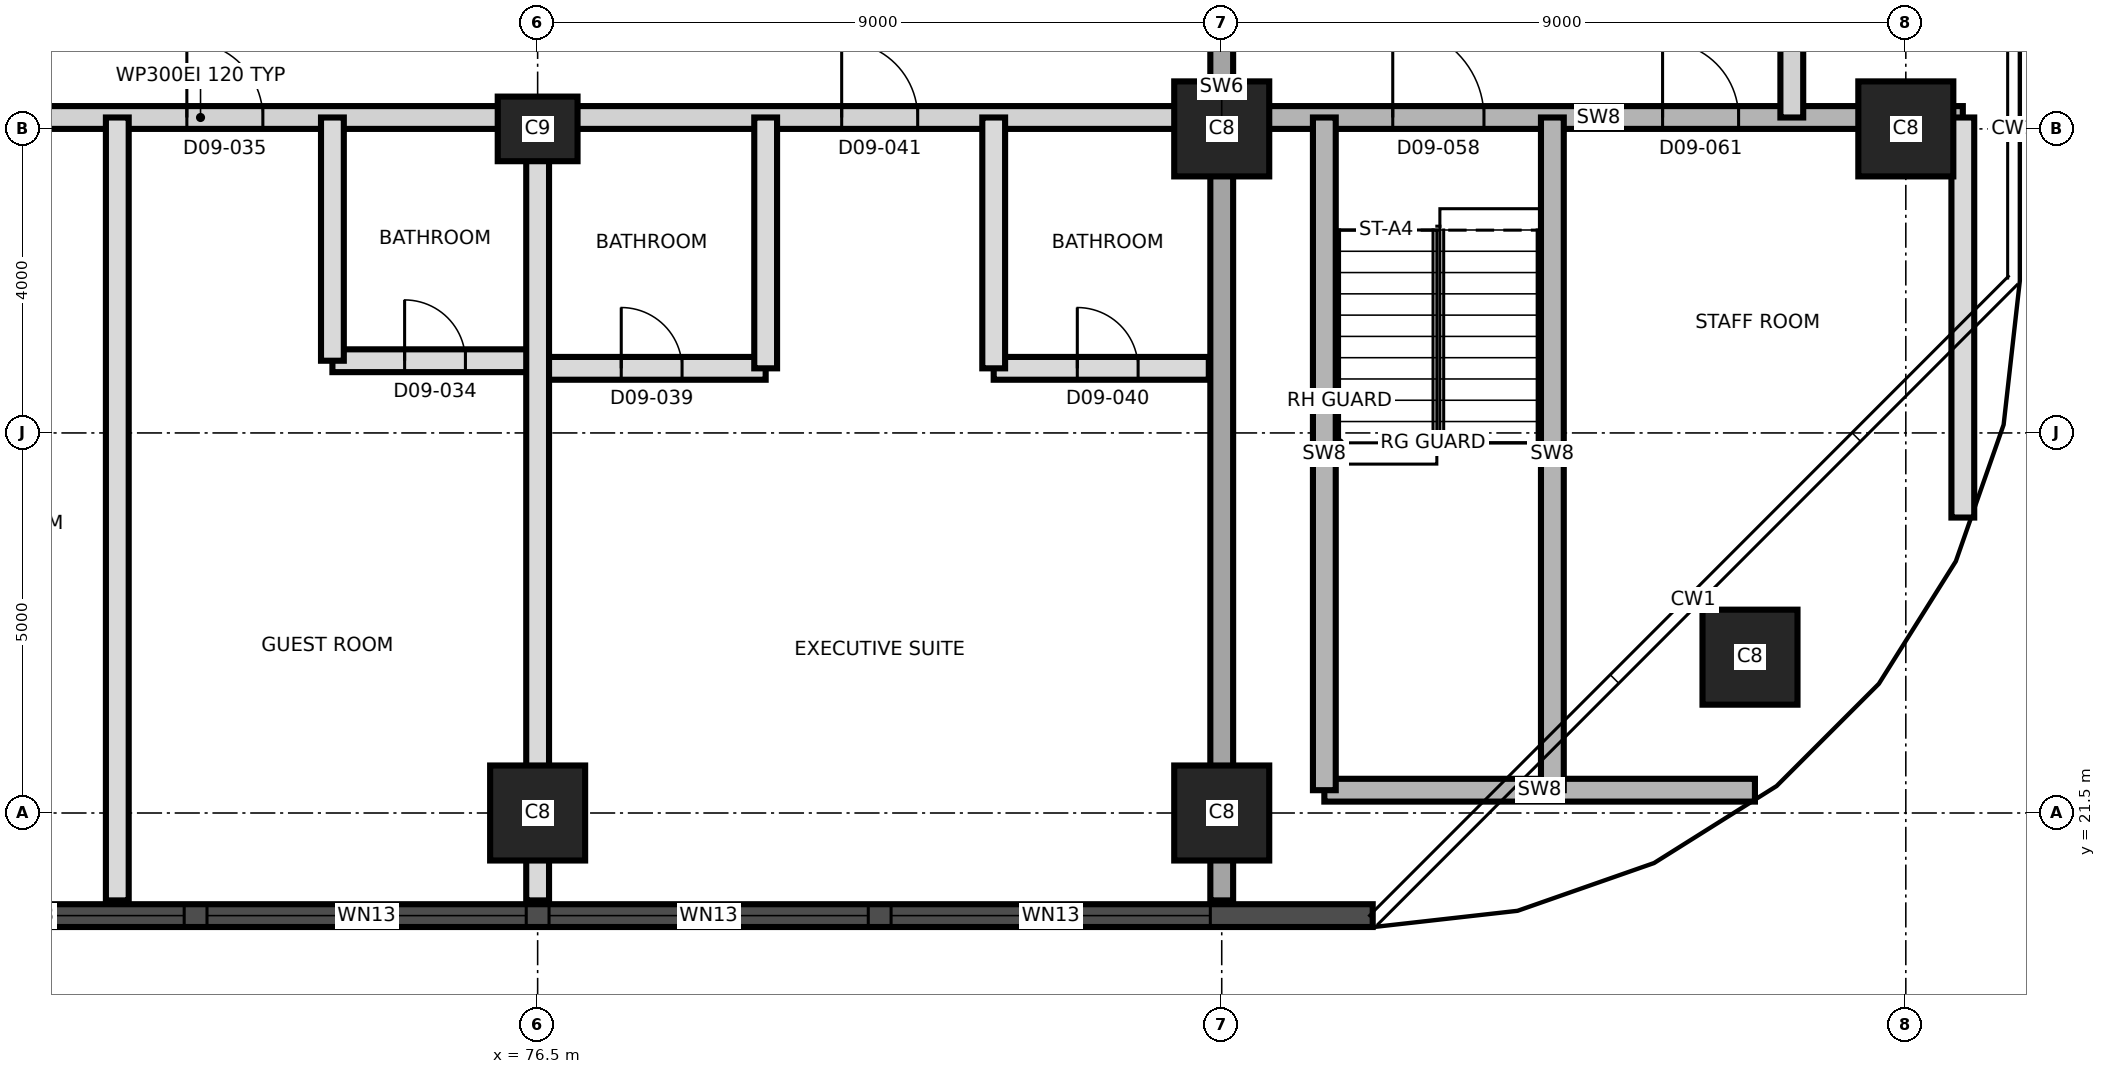
"""IFC4 building model, lengths in metres.
Left out: names, types, materials, properties, quantities, classifications, styles, units other than length and angle.
Written with IfcOpenShell. Run it as: python <this file> out.ifc"""

import sys

from ifc_helpers import new_model, si_unit, direction, frame, frame_2d, origin, origin_2d, place, context, subcontext, project, spatial, rectangle, extrude, element, fill, save


model = new_model("IFC4")
c1 = context("Model", 3, precision=1e-05, world=origin(), true_north=direction((0.0, 1.0)))
c2 = subcontext(c1, "Body", "Model", "MODEL_VIEW")
j1 = project(units=[si_unit("LENGTHUNIT", "METRE"), si_unit("PLANEANGLEUNIT", "RADIAN")], contexts=[c1])
p1 = place(None, origin())
s1 = spatial("IfcSite", under=j1, at=p1, CompositionType="ELEMENT")
p2 = place(p1, origin())
s2 = spatial("IfcBuilding", under=s1, at=p2, CompositionType="ELEMENT")
p3 = place(p2, frame((0.0, 0.0, 105.6)))
s3 = spatial("IfcBuildingStorey", under=s2, at=p3, CompositionType="ELEMENT", Elevation=105.6)
for number, where, z_axis, x_axis in (
    (1, (76.5, 21.5, 0.0), (0.0, 0.0, 1.0), (1.0, 0.0, 0.0)),
    (2, (85.5, 21.5, 0.0), (0.0, 0.0, 1.0), (1.0, 0.0, 0.0)),
    (3, (92.45, 23.55, 0.0), (0.0, 0.0, 1.0), (1.0, 0.0, 0.0)),
):
    element("IfcColumn", number, at=place(p3, frame(where, z_axis=z_axis, x_axis=x_axis)), inside=s3, PredefinedType="COLUMN", context=c2, shape_type="SweptSolid", body=[
        extrude(rectangle(XDim=1.25, YDim=1.25, at=origin_2d()), origin(), (0.0, 0.0, 1.0), 3.7),
    ])
p4 = place(p3, frame((76.5, 30.5, 0.0), z_axis=(0.0, 0.0, 1.0), x_axis=(1.0, 0.0, 0.0)))
e4 = element("IfcColumn", 4, at=p4, inside=s3, PredefinedType="COLUMN", context=c2, shape_type="SweptSolid", body=[
    extrude(rectangle(XDim=1.05, YDim=0.85, at=origin_2d()), origin(), (0.0, 0.0, 1.0), 3.7),
])
for number, where, z_axis, x_axis in (
    (5, (85.5, 30.5, 0.0), (0.0, 0.0, 1.0), (1.0, 0.0, 0.0)),
    (6, (94.5, 30.5, 0.0), (0.0, 0.0, 1.0), (1.0, 0.0, 0.0)),
):
    element("IfcColumn", number, at=place(p3, frame(where, z_axis=z_axis, x_axis=x_axis)), inside=s3, PredefinedType="COLUMN", context=c2, shape_type="SweptSolid", body=[
        extrude(rectangle(XDim=1.25, YDim=1.25, at=origin_2d()), origin(), (0.0, 0.0, 1.0), 3.7),
    ])
p5 = place(p3, frame((85.5, 20.35, 0.0), z_axis=(0.0, 0.0, 1.0), x_axis=(0.0, 1.0, 0.0)))
e7 = element("IfcWall", 7, at=p5, inside=s3, PredefinedType="SHEAR", context=c2, shape_type="SweptSolid", body=[
    extrude(rectangle(XDim=20.3, YDim=0.3, at=frame_2d((10.15, 0.0))), origin(), (0.0, 0.0, 1.0), 3.7),
])
p6 = place(p5, frame((11.35, 0.0, 0.0)))
e8 = element("IfcOpeningElement", 8, at=p6, cuts=e7, PredefinedType="OPENING", context=c2, shape_type="SweptSolid", body=[
    extrude(rectangle(XDim=1.4, YDim=2.1, at=frame_2d((0.7, 1.05))), frame((0.0, 0.16, 0.0), z_axis=(0.0, -1.0, 0.0), x_axis=(1.0, 0.0, 0.0)), (0.0, 0.0, 1.0), 0.32),
])
p7 = place(p3, frame((44.011, 20.15, 0.0), z_axis=(0.0, 0.0, 1.0), x_axis=(1.0, 0.0, 0.0)))
e9 = element("IfcWall", 9, at=p7, inside=s3, PredefinedType="SOLIDWALL", context=c2, shape_type="SweptSolid", body=[
    extrude(rectangle(XDim=43.476, YDim=0.3, at=frame_2d((21.738, 0.0))), origin(), (0.0, 0.0, 1.0), 3.4),
])
p8 = place(p7, frame((1.845, 0.0, 0.3)))
e10 = element("IfcOpeningElement", 10, at=p8, cuts=e9, PredefinedType="OPENING", context=c2, shape_type="SweptSolid", body=[
    extrude(rectangle(XDim=1.8, YDim=2.4, at=frame_2d((0.9, 1.2))), frame((0.0, 0.16, 0.0), z_axis=(0.0, -1.0, 0.0), x_axis=(1.0, 0.0, 0.0)), (0.0, 0.0, 1.0), 0.32),
])
p9 = place(p7, frame((5.639, 0.0, 0.9)))
e11 = element("IfcOpeningElement", 11, at=p9, cuts=e9, PredefinedType="OPENING", context=c2, shape_type="SweptSolid", body=[
    extrude(rectangle(XDim=4.2, YDim=1.7, at=frame_2d((2.1, 0.85))), frame((0.0, 0.16, 0.0), z_axis=(0.0, -1.0, 0.0), x_axis=(1.0, 0.0, 0.0)), (0.0, 0.0, 1.0), 0.32),
])
p10 = place(p7, frame((10.139, 0.0, 0.9)))
e12 = element("IfcOpeningElement", 12, at=p10, cuts=e9, PredefinedType="OPENING", context=c2, shape_type="SweptSolid", body=[
    extrude(rectangle(XDim=4.2, YDim=1.7, at=frame_2d((2.1, 0.85))), frame((0.0, 0.16, 0.0), z_axis=(0.0, -1.0, 0.0), x_axis=(1.0, 0.0, 0.0)), (0.0, 0.0, 1.0), 0.32),
])
p11 = place(p7, frame((14.639, 0.0, 0.9)))
e13 = element("IfcOpeningElement", 13, at=p11, cuts=e9, PredefinedType="OPENING", context=c2, shape_type="SweptSolid", body=[
    extrude(rectangle(XDim=4.2, YDim=1.7, at=frame_2d((2.1, 0.85))), frame((0.0, 0.16, 0.0), z_axis=(0.0, -1.0, 0.0), x_axis=(1.0, 0.0, 0.0)), (0.0, 0.0, 1.0), 0.32),
])
p12 = place(p7, frame((19.139, 0.0, 0.9)))
e14 = element("IfcOpeningElement", 14, at=p12, cuts=e9, PredefinedType="OPENING", context=c2, shape_type="SweptSolid", body=[
    extrude(rectangle(XDim=4.2, YDim=1.7, at=frame_2d((2.1, 0.85))), frame((0.0, 0.16, 0.0), z_axis=(0.0, -1.0, 0.0), x_axis=(1.0, 0.0, 0.0)), (0.0, 0.0, 1.0), 0.32),
])
p13 = place(p7, frame((23.639, 0.0, 0.9)))
e15 = element("IfcOpeningElement", 15, at=p13, cuts=e9, PredefinedType="OPENING", context=c2, shape_type="SweptSolid", body=[
    extrude(rectangle(XDim=4.2, YDim=1.7, at=frame_2d((2.1, 0.85))), frame((0.0, 0.16, 0.0), z_axis=(0.0, -1.0, 0.0), x_axis=(1.0, 0.0, 0.0)), (0.0, 0.0, 1.0), 0.32),
])
p14 = place(p7, frame((28.139, 0.0, 0.9)))
e16 = element("IfcOpeningElement", 16, at=p14, cuts=e9, PredefinedType="OPENING", context=c2, shape_type="SweptSolid", body=[
    extrude(rectangle(XDim=4.2, YDim=1.7, at=frame_2d((2.1, 0.85))), frame((0.0, 0.16, 0.0), z_axis=(0.0, -1.0, 0.0), x_axis=(1.0, 0.0, 0.0)), (0.0, 0.0, 1.0), 0.32),
])
p15 = place(p7, frame((32.639, 0.0, 0.9)))
e17 = element("IfcOpeningElement", 17, at=p15, cuts=e9, PredefinedType="OPENING", context=c2, shape_type="SweptSolid", body=[
    extrude(rectangle(XDim=4.2, YDim=1.7, at=frame_2d((2.1, 0.85))), frame((0.0, 0.16, 0.0), z_axis=(0.0, -1.0, 0.0), x_axis=(1.0, 0.0, 0.0)), (0.0, 0.0, 1.0), 0.32),
])
p16 = place(p7, frame((37.139, 0.0, 0.9)))
e18 = element("IfcOpeningElement", 18, at=p16, cuts=e9, PredefinedType="OPENING", context=c2, shape_type="SweptSolid", body=[
    extrude(rectangle(XDim=4.2, YDim=1.7, at=frame_2d((2.1, 0.85))), frame((0.0, 0.16, 0.0), z_axis=(0.0, -1.0, 0.0), x_axis=(1.0, 0.0, 0.0)), (0.0, 0.0, 1.0), 0.32),
])
p17 = place(p3, frame((86.85, 21.8, 0.0), z_axis=(0.0, 0.0, 1.0), x_axis=(1.0, 0.0, 0.0)))
e19 = element("IfcWall", 19, at=p17, inside=s3, PredefinedType="SHEAR", context=c2, shape_type="SweptSolid", body=[
    extrude(rectangle(XDim=5.665, YDim=0.3, at=frame_2d((2.833, 0.0))), origin(), (0.0, 0.0, 1.0), 3.4),
])
p18 = place(p3, frame((76.5, 27.35, 0.0), z_axis=(0.0, 0.0, 1.0), x_axis=(1.0, 0.0, 0.0)))
e20 = element("IfcWall", 20, at=p18, inside=s3, PredefinedType="PARTITIONING", context=c2, shape_type="SweptSolid", body=[
    extrude(rectangle(XDim=3.0, YDim=0.3, at=frame_2d((1.5, 0.0))), origin(), (0.0, 0.0, 1.0), 3.4),
])
p19 = place(p18, frame((1.1, 0.0, 0.0)))
e21 = element("IfcOpeningElement", 21, at=p19, cuts=e20, PredefinedType="OPENING", context=c2, shape_type="SweptSolid", body=[
    extrude(rectangle(XDim=0.8, YDim=2.1, at=frame_2d((0.4, 1.05))), frame((0.0, 0.16, 0.0), z_axis=(0.0, -1.0, 0.0), x_axis=(1.0, 0.0, 0.0)), (0.0, 0.0, 1.0), 0.32),
])
p20 = place(p3, frame((82.5, 27.35, 0.0), z_axis=(0.0, 0.0, 1.0), x_axis=(1.0, 0.0, 0.0)))
e22 = element("IfcWall", 22, at=p20, inside=s3, PredefinedType="PARTITIONING", context=c2, shape_type="SweptSolid", body=[
    extrude(rectangle(XDim=2.83, YDim=0.3, at=frame_2d((1.415, 0.0))), origin(), (0.0, 0.0, 1.0), 3.4),
])
p21 = place(p20, frame((1.1, 0.0, 0.0)))
e23 = element("IfcOpeningElement", 23, at=p21, cuts=e22, PredefinedType="OPENING", context=c2, shape_type="SweptSolid", body=[
    extrude(rectangle(XDim=0.8, YDim=2.1, at=frame_2d((0.4, 1.05))), frame((0.0, 0.16, 0.0), z_axis=(0.0, -1.0, 0.0), x_axis=(1.0, 0.0, 0.0)), (0.0, 0.0, 1.0), 0.32),
])
p22 = place(p3, frame((73.8, 27.45, 0.0), z_axis=(0.0, 0.0, 1.0), x_axis=(1.0, 0.0, 0.0)))
e24 = element("IfcWall", 24, at=p22, inside=s3, PredefinedType="PARTITIONING", context=c2, shape_type="SweptSolid", body=[
    extrude(rectangle(XDim=2.7, YDim=0.3, at=frame_2d((1.35, 0.0))), origin(), (0.0, 0.0, 1.0), 3.4),
])
p23 = place(p22, frame((0.95, 0.0, 0.0)))
e25 = element("IfcOpeningElement", 25, at=p23, cuts=e24, PredefinedType="OPENING", context=c2, shape_type="SweptSolid", body=[
    extrude(rectangle(XDim=0.8, YDim=2.1, at=frame_2d((0.4, 1.05))), frame((0.0, 0.16, 0.0), z_axis=(0.0, -1.0, 0.0), x_axis=(1.0, 0.0, 0.0)), (0.0, 0.0, 1.0), 0.32),
])
p24 = place(p3, frame((58.8, 30.65, 0.0), z_axis=(0.0, 0.0, 1.0), x_axis=(1.0, 0.0, 0.0)))
e26 = element("IfcWall", 26, at=p24, inside=s3, PredefinedType="PARTITIONING", context=c2, shape_type="SweptSolid", body=[
    extrude(rectangle(XDim=26.53, YDim=0.3, at=frame_2d((13.265, 0.0))), origin(), (0.0, 0.0, 1.0), 3.4),
])
p25 = place(p24, frame((3.115, 0.0, 0.0)))
e27 = element("IfcOpeningElement", 27, at=p25, cuts=e26, PredefinedType="OPENING", context=c2, shape_type="SweptSolid", body=[
    extrude(rectangle(XDim=1.0, YDim=2.1, at=frame_2d((0.5, 1.05))), frame((0.0, 0.16, 0.0), z_axis=(0.0, -1.0, 0.0), x_axis=(1.0, 0.0, 0.0)), (0.0, 0.0, 1.0), 0.32),
])
p26 = place(p24, frame((6.065, 0.0, 0.0)))
e28 = element("IfcOpeningElement", 28, at=p26, cuts=e26, PredefinedType="OPENING", context=c2, shape_type="SweptSolid", body=[
    extrude(rectangle(XDim=1.4, YDim=2.1, at=frame_2d((0.7, 1.05))), frame((0.0, 0.16, 0.0), z_axis=(0.0, -1.0, 0.0), x_axis=(1.0, 0.0, 0.0)), (0.0, 0.0, 1.0), 0.32),
])
p27 = place(p24, frame((9.835, 0.0, 0.0)))
e29 = element("IfcOpeningElement", 29, at=p27, cuts=e26, PredefinedType="OPENING", context=c2, shape_type="SweptSolid", body=[
    extrude(rectangle(XDim=1.2, YDim=2.1, at=frame_2d((0.6, 1.05))), frame((0.0, 0.16, 0.0), z_axis=(0.0, -1.0, 0.0), x_axis=(1.0, 0.0, 0.0)), (0.0, 0.0, 1.0), 0.32),
])
p28 = place(p24, frame((13.085, 0.0, 0.0)))
e30 = element("IfcOpeningElement", 30, at=p28, cuts=e26, PredefinedType="OPENING", context=c2, shape_type="SweptSolid", body=[
    extrude(rectangle(XDim=1.0, YDim=2.1, at=frame_2d((0.5, 1.05))), frame((0.0, 0.16, 0.0), z_axis=(0.0, -1.0, 0.0), x_axis=(1.0, 0.0, 0.0)), (0.0, 0.0, 1.0), 0.32),
])
p29 = place(p24, frame((21.7, 0.0, 0.0)))
e31 = element("IfcOpeningElement", 31, at=p29, cuts=e26, PredefinedType="OPENING", context=c2, shape_type="SweptSolid", body=[
    extrude(rectangle(XDim=1.0, YDim=2.4, at=frame_2d((0.5, 1.2))), frame((0.0, 0.16, 0.0), z_axis=(0.0, -1.0, 0.0), x_axis=(1.0, 0.0, 0.0)), (0.0, 0.0, 1.0), 0.32),
])
p30 = place(p3, frame((85.67, 30.65, 0.0), z_axis=(0.0, 0.0, 1.0), x_axis=(1.0, 0.0, 0.0)))
e32 = element("IfcWall", 32, at=p30, inside=s3, PredefinedType="SHEAR", context=c2, shape_type="SweptSolid", body=[
    extrude(rectangle(XDim=9.58, YDim=0.3, at=frame_2d((4.79, 0.0))), origin(), (0.0, 0.0, 1.0), 3.4),
])
p31 = place(p30, frame((2.08, 0.0, 0.0)))
e33 = element("IfcOpeningElement", 33, at=p31, cuts=e32, PredefinedType="OPENING", context=c2, shape_type="SweptSolid", body=[
    extrude(rectangle(XDim=1.2, YDim=2.1, at=frame_2d((0.6, 1.05))), frame((0.0, 0.16, 0.0), z_axis=(0.0, -1.0, 0.0), x_axis=(1.0, 0.0, 0.0)), (0.0, 0.0, 1.0), 0.32),
])
p32 = place(p30, frame((5.63, 0.0, 0.0)))
e34 = element("IfcOpeningElement", 34, at=p32, cuts=e32, PredefinedType="OPENING", context=c2, shape_type="SweptSolid", body=[
    extrude(rectangle(XDim=1.0, YDim=2.1, at=frame_2d((0.5, 1.05))), frame((0.0, 0.16, 0.0), z_axis=(0.0, -1.0, 0.0), x_axis=(1.0, 0.0, 0.0)), (0.0, 0.0, 1.0), 0.32),
])
p33 = place(p3, frame((70.97, 20.35, 0.0), z_axis=(0.0, 0.0, 1.0), x_axis=(0.0, 1.0, 0.0)))
e35 = element("IfcWall", 35, at=p33, inside=s3, PredefinedType="PARTITIONING", context=c2, shape_type="SweptSolid", body=[
    extrude(rectangle(XDim=10.3, YDim=0.3, at=frame_2d((5.15, 0.0))), origin(), (0.0, 0.0, 1.0), 3.4),
])
p34 = place(p3, frame((73.8, 27.45, 0.0), z_axis=(0.0, 0.0, 1.0), x_axis=(0.0, 1.0, 0.0)))
e36 = element("IfcWall", 36, at=p34, inside=s3, PredefinedType="PARTITIONING", context=c2, shape_type="SweptSolid", body=[
    extrude(rectangle(XDim=3.2, YDim=0.3, at=frame_2d((1.6, 0.0))), origin(), (0.0, 0.0, 1.0), 3.4),
])
p35 = place(p3, frame((76.5, 20.35, 0.0), z_axis=(0.0, 0.0, 1.0), x_axis=(0.0, 1.0, 0.0)))
e37 = element("IfcWall", 37, at=p35, inside=s3, PredefinedType="PARTITIONING", context=c2, shape_type="SweptSolid", body=[
    extrude(rectangle(XDim=10.3, YDim=0.3, at=frame_2d((5.15, 0.0))), origin(), (0.0, 0.0, 1.0), 3.4),
])
for number, where, z_axis, x_axis in (
    (38, (79.5, 27.35, 0.0), (0.0, 0.0, 1.0), (0.0, 1.0, 0.0)),
    (39, (82.5, 27.35, 0.0), (0.0, 0.0, 1.0), (0.0, 1.0, 0.0)),
):
    element("IfcWall", number, at=place(p3, frame(where, z_axis=z_axis, x_axis=x_axis)), inside=s3, PredefinedType="PARTITIONING", context=c2, shape_type="SweptSolid", body=[
        extrude(rectangle(XDim=3.3, YDim=0.3, at=frame_2d((1.65, 0.0))), origin(), (0.0, 0.0, 1.0), 3.4),
    ])
for number, where, z_axis, x_axis in (
    (40, (86.85, 21.8, 0.0), (0.0, 0.0, 1.0), (0.0, 1.0, 0.0)),
    (41, (89.85, 21.8, 0.0), (0.0, 0.0, 1.0), (0.0, 1.0, 0.0)),
):
    element("IfcWall", number, at=place(p3, frame(where, z_axis=z_axis, x_axis=x_axis)), inside=s3, PredefinedType="SHEAR", context=c2, shape_type="SweptSolid", body=[
        extrude(rectangle(XDim=8.85, YDim=0.3, at=frame_2d((4.425, 0.0))), origin(), (0.0, 0.0, 1.0), 3.4),
    ])
p36 = place(p3, frame((93.0, 30.65, 0.0), z_axis=(0.0, 0.0, 1.0), x_axis=(0.0, 1.0, 0.0)))
e42 = element("IfcWall", 42, at=p36, inside=s3, PredefinedType="PARTITIONING", context=c2, shape_type="SweptSolid", body=[
    extrude(rectangle(XDim=2.7, YDim=0.3, at=frame_2d((1.35, 0.0))), origin(), (0.0, 0.0, 1.0), 3.4),
])
p37 = place(p3, frame((95.25, 25.387, 0.0), z_axis=(0.0, 0.0, 1.0), x_axis=(0.0, 1.0, 0.0)))
e43 = element("IfcWall", 43, at=p37, inside=s3, PredefinedType="PARTITIONING", context=c2, shape_type="SweptSolid", body=[
    extrude(rectangle(XDim=5.263, YDim=0.3, at=frame_2d((2.631, 0.0))), origin(), (0.0, 0.0, 1.0), 3.4),
])
p38 = place(p13, origin())
e44 = element("IfcWindow", 44, at=p38, inside=s3, PartitioningType="SINGLE_PANEL", PredefinedType="WINDOW", context=c2, shape_type="SweptSolid", body=[
    extrude(rectangle(XDim=4.2, YDim=1.7, at=frame_2d((2.1, 0.85))), frame((0.0, 0.03, 0.0), z_axis=(0.0, -1.0, 0.0), x_axis=(1.0, 0.0, 0.0)), (0.0, 0.0, 1.0), 0.06),
])
fill(e15, e44)
p39 = place(p14, origin())
e45 = element("IfcWindow", 45, at=p39, inside=s3, PartitioningType="SINGLE_PANEL", PredefinedType="WINDOW", context=c2, shape_type="SweptSolid", body=[
    extrude(rectangle(XDim=4.2, YDim=1.7, at=frame_2d((2.1, 0.85))), frame((0.0, 0.03, 0.0), z_axis=(0.0, -1.0, 0.0), x_axis=(1.0, 0.0, 0.0)), (0.0, 0.0, 1.0), 0.06),
])
fill(e16, e45)
p40 = place(p15, origin())
e46 = element("IfcWindow", 46, at=p40, inside=s3, PartitioningType="SINGLE_PANEL", PredefinedType="WINDOW", context=c2, shape_type="SweptSolid", body=[
    extrude(rectangle(XDim=4.2, YDim=1.7, at=frame_2d((2.1, 0.85))), frame((0.0, 0.03, 0.0), z_axis=(0.0, -1.0, 0.0), x_axis=(1.0, 0.0, 0.0)), (0.0, 0.0, 1.0), 0.06),
])
fill(e17, e46)
p41 = place(p16, origin())
e47 = element("IfcWindow", 47, at=p41, inside=s3, PartitioningType="SINGLE_PANEL", PredefinedType="WINDOW", context=c2, shape_type="SweptSolid", body=[
    extrude(rectangle(XDim=4.2, YDim=1.7, at=frame_2d((2.1, 0.85))), frame((0.0, 0.03, 0.0), z_axis=(0.0, -1.0, 0.0), x_axis=(1.0, 0.0, 0.0)), (0.0, 0.0, 1.0), 0.06),
])
fill(e18, e47)
p42 = place(p23, origin())
e48 = element("IfcDoor", 48, at=p42, inside=s3, OperationType="SINGLE_SWING_RIGHT", PredefinedType="DOOR", context=c2, shape_type="SweptSolid", body=[
    extrude(rectangle(XDim=0.8, YDim=2.1, at=frame_2d((0.4, 1.05))), frame((0.0, 0.025, 0.0), z_axis=(0.0, -1.0, 0.0), x_axis=(1.0, 0.0, 0.0)), (0.0, 0.0, 1.0), 0.05),
])
fill(e25, e48)
p43 = place(p28, origin())
e49 = element("IfcDoor", 49, at=p43, inside=s3, OperationType="SINGLE_SWING_LEFT", PredefinedType="DOOR", context=c2, shape_type="SweptSolid", body=[
    extrude(rectangle(XDim=1.0, YDim=2.1, at=frame_2d((0.5, 1.05))), frame((0.0, 0.025, 0.0), z_axis=(0.0, -1.0, 0.0), x_axis=(1.0, 0.0, 0.0)), (0.0, 0.0, 1.0), 0.05),
])
fill(e30, e49)
p44 = place(p19, origin())
e50 = element("IfcDoor", 50, at=p44, inside=s3, OperationType="SINGLE_SWING_LEFT", PredefinedType="DOOR", context=c2, shape_type="SweptSolid", body=[
    extrude(rectangle(XDim=0.8, YDim=2.1, at=frame_2d((0.4, 1.05))), frame((0.0, 0.025, 0.0), z_axis=(0.0, -1.0, 0.0), x_axis=(1.0, 0.0, 0.0)), (0.0, 0.0, 1.0), 0.05),
])
fill(e21, e50)
p45 = place(p21, origin())
e51 = element("IfcDoor", 51, at=p45, inside=s3, OperationType="SINGLE_SWING_RIGHT", PredefinedType="DOOR", context=c2, shape_type="SweptSolid", body=[
    extrude(rectangle(XDim=0.8, YDim=2.1, at=frame_2d((0.4, 1.05))), frame((0.0, 0.025, 0.0), z_axis=(0.0, -1.0, 0.0), x_axis=(1.0, 0.0, 0.0)), (0.0, 0.0, 1.0), 0.05),
])
fill(e23, e51)
p46 = place(p29, origin())
e52 = element("IfcDoor", 52, at=p46, inside=s3, OperationType="SINGLE_SWING_LEFT", PredefinedType="DOOR", context=c2, shape_type="SweptSolid", body=[
    extrude(rectangle(XDim=1.0, YDim=2.4, at=frame_2d((0.5, 1.2))), frame((0.0, 0.025, 0.0), z_axis=(0.0, -1.0, 0.0), x_axis=(1.0, 0.0, 0.0)), (0.0, 0.0, 1.0), 0.05),
])
fill(e31, e52)
p47 = place(p31, origin())
e53 = element("IfcDoor", 53, at=p47, inside=s3, OperationType="SINGLE_SWING_LEFT", PredefinedType="DOOR", context=c2, shape_type="SweptSolid", body=[
    extrude(rectangle(XDim=1.2, YDim=2.1, at=frame_2d((0.6, 1.05))), frame((0.0, 0.025, 0.0), z_axis=(0.0, -1.0, 0.0), x_axis=(1.0, 0.0, 0.0)), (0.0, 0.0, 1.0), 0.05),
])
fill(e33, e53)
p48 = place(p32, origin())
e54 = element("IfcDoor", 54, at=p48, inside=s3, OperationType="SINGLE_SWING_LEFT", PredefinedType="DOOR", context=c2, shape_type="SweptSolid", body=[
    extrude(rectangle(XDim=1.0, YDim=2.1, at=frame_2d((0.5, 1.05))), frame((0.0, 0.025, 0.0), z_axis=(0.0, -1.0, 0.0), x_axis=(1.0, 0.0, 0.0)), (0.0, 0.0, 1.0), 0.05),
])
fill(e34, e54)
save(model, sys.argv[1])
